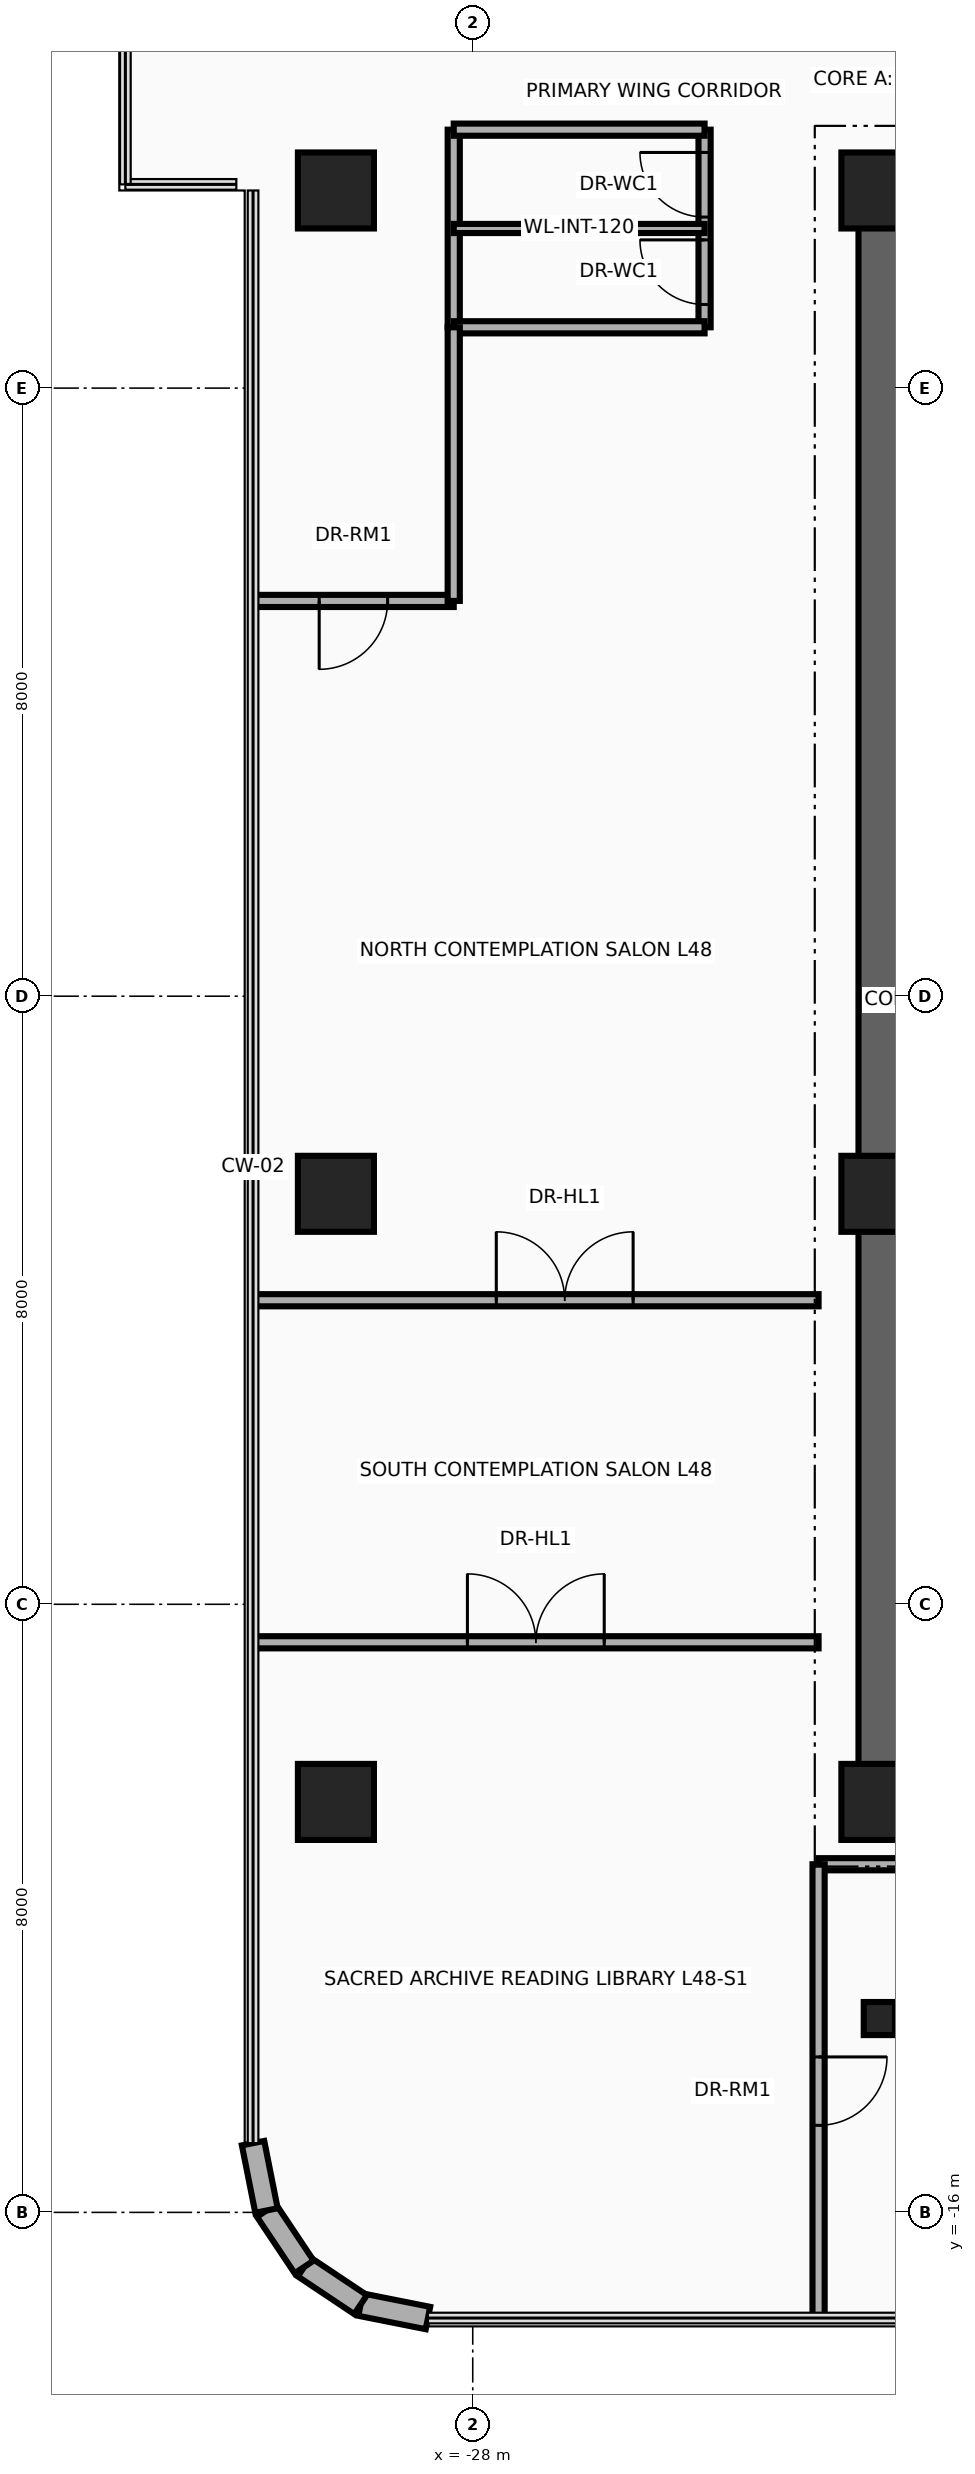
"""IFC4 building model, lengths in metres.
Left out: names, types, materials, properties, quantities, classifications, styles, units other than length and angle.
Written with IfcOpenShell. Run it as: python <this file> out.ifc"""

import sys

from ifc_helpers import new_model, si_unit, direction, frame, frame_2d, origin, origin_2d, place, context, subcontext, project, spatial, rectangle, i_section, extrude, source, transform, mapped, element, fill, save


model = new_model("IFC4")
c1 = context("Model", 3, precision=1e-05, world=origin(), true_north=direction((0.0, 1.0)))
c2 = subcontext(c1, "Body", "Model", "MODEL_VIEW")
j1 = project(units=[si_unit("LENGTHUNIT", "METRE"), si_unit("PLANEANGLEUNIT", "RADIAN")], contexts=[c1])
p1 = place(None, origin())
s1 = spatial("IfcSite", under=j1, at=p1, CompositionType="ELEMENT")
p2 = place(p1, origin())
s2 = spatial("IfcBuilding", under=s1, at=p2, CompositionType="ELEMENT")
p3 = place(p2, frame((0.0, 0.0, 188.4)))
s3 = spatial("IfcBuildingStorey", under=s2, at=p3, CompositionType="ELEMENT", Elevation=188.4)
p4 = place(p3, frame((-22.65, -11.075, 0.0), z_axis=(0.0, 0.0, 1.0), x_axis=(0.0, 1.0, 0.0)))
e1 = element("IfcWall", 1, at=p4, inside=s3, PredefinedType="SHEAR", context=c2, shape_type="SweptSolid", body=[
    extrude(rectangle(XDim=22.15, YDim=0.55, at=frame_2d((11.075, 0.0))), origin(), (0.0, 0.0, 1.0), 3.63),
])
for number, where, z_axis, x_axis in (
    (2, (-22.65, 10.8, 0.0), (0.0, 0.0, 1.0), (1.0, 0.0, 0.0)),
    (3, (-22.65, -10.8, 0.0), (0.0, 0.0, 1.0), (1.0, 0.0, 0.0)),
):
    element("IfcWall", number, at=place(p3, frame(where, z_axis=z_axis, x_axis=x_axis)), inside=s3, PredefinedType="SHEAR", context=c2, shape_type="SweptSolid", body=[
        extrude(rectangle(XDim=10.25, YDim=0.55, at=frame_2d((5.125, 0.0))), origin(), (0.0, 0.0, 1.0), 3.63),
    ])
m1 = source(origin(), c2, "Body", "SweptSolid", [
    extrude(rectangle(XDim=1.0, YDim=1.0, at=origin_2d()), origin(), (0.0, 0.0, 1.0), 3.95),
])
for number, where, z_axis, x_axis in (
    (4, (-29.8, -10.6, 0.0), (0.0, 0.0, 1.0), (1.0, 0.0, 0.0)),
    (5, (-22.65, -10.6, 0.0), (0.0, 0.0, 1.0), (1.0, 0.0, 0.0)),
    (6, (-29.8, -2.6, 0.0), (0.0, 0.0, 1.0), (1.0, 0.0, 0.0)),
    (7, (-22.65, -2.6, 0.0), (0.0, 0.0, 1.0), (1.0, 0.0, 0.0)),
    (8, (-29.8, 10.6, 0.0), (0.0, 0.0, 1.0), (1.0, 0.0, 0.0)),
    (9, (-22.65, 10.6, 0.0), (0.0, 0.0, 1.0), (1.0, 0.0, 0.0)),
):
    element("IfcColumn", number, at=place(p3, frame(where, z_axis=z_axis, x_axis=x_axis)), inside=s3, PredefinedType="COLUMN", context=c2, shape_type="MappedRepresentation", body=[
        mapped(m1, transform((0.0, 0.0, 0.0), x_axis=(1.0, 0.0, 0.0), y_axis=(0.0, 1.0, 0.0), z_axis=(0.0, 0.0, 1.0), scale=1.0)),
    ])
m2 = source(origin(), c2, "Body", "SweptSolid", [
    extrude(i_section(OverallWidth=0.412, OverallDepth=0.435, WebThickness=0.036, FlangeThickness=0.057, at=origin_2d()), origin(), (0.0, 0.0, 1.0), 3.95),
])
p5 = place(p3, frame((-22.65, -13.45, 0.0), z_axis=(0.0, 0.0, 1.0), x_axis=(1.0, 0.0, 0.0)))
e10 = element("IfcColumn", 10, at=p5, inside=s3, PredefinedType="COLUMN", context=c2, shape_type="MappedRepresentation", body=[
    mapped(m2, transform((0.0, 0.0, 0.0), x_axis=(1.0, 0.0, 0.0), y_axis=(0.0, 1.0, 0.0), z_axis=(0.0, 0.0, 1.0), scale=1.0)),
])
p6 = place(p3, frame((-28.589, -17.39, 0.0), z_axis=(0.0, 0.0, 1.0), x_axis=(-0.980798241101, 0.195025152871, 0.0)))
e11 = element("IfcWall", 11, at=p6, inside=s3, PredefinedType="SOLIDWALL", context=c2, shape_type="SweptSolid", body=[
    extrude(rectangle(XDim=0.904, YDim=0.3, at=frame_2d((0.452, 0.0))), origin(), (0.0, 0.0, 1.0), 3.63),
])
for number, where, z_axis, x_axis in (
    (12, (-29.476, -17.214, 0.0), (0.0, 0.0, 1.0), (-0.832, 0.556, 0.0)),
    (13, (-30.218, -16.718, 0.0), (0.0, 0.0, 1.0), (-0.556, 0.832, 0.0)),
):
    element("IfcWall", number, at=place(p3, frame(where, z_axis=z_axis, x_axis=x_axis)), inside=s3, PredefinedType="SOLIDWALL", context=c2, shape_type="SweptSolid", body=[
        extrude(rectangle(XDim=0.893, YDim=0.3, at=frame_2d((0.446, 0.0))), origin(), (0.0, 0.0, 1.0), 3.63),
    ])
p7 = place(p3, frame((-30.714, -15.976, 0.0), z_axis=(0.0, 0.0, 1.0), x_axis=(-0.195025152871, 0.980798241101, 0.0)))
e14 = element("IfcWall", 14, at=p7, inside=s3, PredefinedType="SOLIDWALL", context=c2, shape_type="SweptSolid", body=[
    extrude(rectangle(XDim=0.904, YDim=0.3, at=frame_2d((0.452, 0.0))), origin(), (0.0, 0.0, 1.0), 3.63),
])
p8 = place(p3, frame((-28.25, 8.8, 0.0), z_axis=(0.0, 0.0, 1.0), x_axis=(0.0, 1.0, 0.0)))
e15 = element("IfcWall", 15, at=p8, inside=s3, PredefinedType="PARTITIONING", context=c2, shape_type="SweptSolid", body=[
    extrude(rectangle(XDim=2.6, YDim=0.16, at=frame_2d((1.3, 0.0))), origin(), (0.0, 0.0, 1.0), 2.665),
])
p9 = place(p3, frame((-24.95, 8.8, 0.0), z_axis=(0.0, 0.0, 1.0), x_axis=(0.0, 1.0, 0.0)))
e16 = element("IfcWall", 16, at=p9, inside=s3, PredefinedType="PARTITIONING", context=c2, shape_type="SweptSolid", body=[
    extrude(rectangle(XDim=2.6, YDim=0.16, at=frame_2d((1.3, 0.0))), origin(), (0.0, 0.0, 1.0), 2.665),
])
p10 = place(p9, frame((0.3, 0.0, 0.0)))
e17 = element("IfcOpeningElement", 17, at=p10, cuts=e16, PredefinedType="OPENING", context=c2, shape_type="SweptSolid", body=[
    extrude(rectangle(XDim=0.85, YDim=2.1, at=frame_2d((0.425, 1.05))), frame((0.0, 0.095, 0.0), z_axis=(0.0, -1.0, 0.0), x_axis=(1.0, 0.0, 0.0)), (0.0, 0.0, 1.0), 0.19),
])
p11 = place(p9, frame((1.45, 0.0, 0.0)))
e18 = element("IfcOpeningElement", 18, at=p11, cuts=e16, PredefinedType="OPENING", context=c2, shape_type="SweptSolid", body=[
    extrude(rectangle(XDim=0.85, YDim=2.1, at=frame_2d((0.425, 1.05))), frame((0.0, 0.095, 0.0), z_axis=(0.0, -1.0, 0.0), x_axis=(1.0, 0.0, 0.0)), (0.0, 0.0, 1.0), 0.19),
])
for number, where, z_axis, x_axis in (
    (19, (-28.25, 8.8, 0.0), (0.0, 0.0, 1.0), (1.0, 0.0, 0.0)),
    (20, (-28.25, 11.4, 0.0), (0.0, 0.0, 1.0), (1.0, 0.0, 0.0)),
):
    element("IfcWall", number, at=place(p3, frame(where, z_axis=z_axis, x_axis=x_axis)), inside=s3, PredefinedType="PARTITIONING", context=c2, shape_type="SweptSolid", body=[
        extrude(rectangle(XDim=3.3, YDim=0.16, at=frame_2d((1.65, 0.0))), origin(), (0.0, 0.0, 1.0), 3.63),
    ])
p12 = place(p3, frame((-28.25, 10.1, 0.0), z_axis=(0.0, 0.0, 1.0), x_axis=(1.0, 0.0, 0.0)))
e21 = element("IfcWall", 21, at=p12, inside=s3, PredefinedType="PARTITIONING", context=c2, shape_type="SweptSolid", body=[
    extrude(rectangle(XDim=3.3, YDim=0.12, at=frame_2d((1.65, 0.0))), origin(), (0.0, 0.0, 1.0), 3.63),
])
p13 = place(p3, frame((-23.45, -11.42, 0.0), z_axis=(0.0, 0.0, 1.0), x_axis=(1.0, 0.0, 0.0)))
e22 = element("IfcWall", 22, at=p13, inside=s3, PredefinedType="PARTITIONING", context=c2, shape_type="SweptSolid", body=[
    extrude(rectangle(XDim=13.84, YDim=0.16, at=frame_2d((6.92, 0.0))), origin(), (0.0, 0.0, 1.0), 3.004),
])
p14 = place(p3, frame((-23.45, -17.39, 0.0), z_axis=(0.0, 0.0, 1.0), x_axis=(0.0, 1.0, 0.0)))
e23 = element("IfcWall", 23, at=p14, inside=s3, PredefinedType="PARTITIONING", context=c2, shape_type="SweptSolid", body=[
    extrude(rectangle(XDim=5.97, YDim=0.16, at=frame_2d((2.985, 0.0))), origin(), (0.0, 0.0, 1.0), 3.63),
])
p15 = place(p14, frame((2.535, 0.0, 0.0)))
e24 = element("IfcOpeningElement", 24, at=p15, cuts=e23, PredefinedType="OPENING", context=c2, shape_type="SweptSolid", body=[
    extrude(rectangle(XDim=0.9, YDim=2.1, at=frame_2d((0.45, 1.05))), frame((0.0, 0.095, 0.0), z_axis=(0.0, -1.0, 0.0), x_axis=(1.0, 0.0, 0.0)), (0.0, 0.0, 1.0), 0.19),
])
p16 = place(p3, frame((-30.89, -8.5, 0.0), z_axis=(0.0, 0.0, 1.0), x_axis=(1.0, 0.0, 0.0)))
e25 = element("IfcWall", 25, at=p16, inside=s3, PredefinedType="PARTITIONING", context=c2, shape_type="SweptSolid", body=[
    extrude(rectangle(XDim=7.44, YDim=0.16, at=frame_2d((3.72, 0.0))), origin(), (0.0, 0.0, 1.0), 3.076),
])
p17 = place(p16, frame((2.82, 0.0, 0.0)))
e26 = element("IfcOpeningElement", 26, at=p17, cuts=e25, PredefinedType="OPENING", context=c2, shape_type="SweptSolid", body=[
    extrude(rectangle(XDim=1.8, YDim=2.15, at=frame_2d((0.9, 1.075))), frame((0.0, 0.095, 0.0), z_axis=(0.0, -1.0, 0.0), x_axis=(1.0, 0.0, 0.0)), (0.0, 0.0, 1.0), 0.19),
])
p18 = place(p3, frame((-30.89, 5.2, 0.0), z_axis=(0.0, 0.0, 1.0), x_axis=(1.0, 0.0, 0.0)))
e27 = element("IfcWall", 27, at=p18, inside=s3, PredefinedType="PARTITIONING", context=c2, shape_type="SweptSolid", body=[
    extrude(rectangle(XDim=2.64, YDim=0.16, at=frame_2d((1.32, 0.0))), origin(), (0.0, 0.0, 1.0), 3.076),
])
p19 = place(p18, frame((0.87, 0.0, 0.0)))
e28 = element("IfcOpeningElement", 28, at=p19, cuts=e27, PredefinedType="OPENING", context=c2, shape_type="SweptSolid", body=[
    extrude(rectangle(XDim=0.9, YDim=2.1, at=frame_2d((0.45, 1.05))), frame((0.0, 0.095, 0.0), z_axis=(0.0, -1.0, 0.0), x_axis=(1.0, 0.0, 0.0)), (0.0, 0.0, 1.0), 0.19),
])
p20 = place(p3, frame((-28.25, 5.2, 0.0), z_axis=(0.0, 0.0, 1.0), x_axis=(0.0, 1.0, 0.0)))
e29 = element("IfcWall", 29, at=p20, inside=s3, PredefinedType="PARTITIONING", context=c2, shape_type="SweptSolid", body=[
    extrude(rectangle(XDim=3.6, YDim=0.16, at=frame_2d((1.8, 0.0))), origin(), (0.0, 0.0, 1.0), 3.158),
])
p21 = place(p3, frame((-30.89, -4.0, 0.0), z_axis=(0.0, 0.0, 1.0), x_axis=(1.0, 0.0, 0.0)))
e30 = element("IfcWall", 30, at=p21, inside=s3, PredefinedType="PARTITIONING", context=c2, shape_type="SweptSolid", body=[
    extrude(rectangle(XDim=7.44, YDim=0.16, at=frame_2d((3.72, 0.0))), origin(), (0.0, 0.0, 1.0), 3.076),
])
p22 = place(p21, frame((3.2, 0.0, 0.0)))
e31 = element("IfcOpeningElement", 31, at=p22, cuts=e30, PredefinedType="OPENING", context=c2, shape_type="SweptSolid", body=[
    extrude(rectangle(XDim=1.8, YDim=2.15, at=frame_2d((0.9, 1.075))), frame((0.0, 0.095, 0.0), z_axis=(0.0, -1.0, 0.0), x_axis=(1.0, 0.0, 0.0)), (0.0, 0.0, 1.0), 0.19),
])
p23 = place(p10, origin())
e32 = element("IfcDoor", 32, at=p23, inside=s3, OperationType="SINGLE_SWING_RIGHT", PredefinedType="DOOR", context=c2, shape_type="SweptSolid", body=[
    extrude(rectangle(XDim=0.85, YDim=2.1, at=frame_2d((0.425, 1.05))), frame((0.0, 0.025, 0.0), z_axis=(0.0, -1.0, 0.0), x_axis=(1.0, 0.0, 0.0)), (0.0, 0.0, 1.0), 0.05),
])
fill(e17, e32)
p24 = place(p11, origin())
e33 = element("IfcDoor", 33, at=p24, inside=s3, OperationType="SINGLE_SWING_LEFT", PredefinedType="DOOR", context=c2, shape_type="SweptSolid", body=[
    extrude(rectangle(XDim=0.85, YDim=2.1, at=frame_2d((0.425, 1.05))), frame((0.0, 0.025, 0.0), z_axis=(0.0, -1.0, 0.0), x_axis=(1.0, 0.0, 0.0)), (0.0, 0.0, 1.0), 0.05),
])
fill(e18, e33)
p25 = place(p17, origin())
e34 = element("IfcDoor", 34, at=p25, inside=s3, OperationType="DOUBLE_DOOR_SINGLE_SWING", PredefinedType="DOOR", context=c2, shape_type="SweptSolid", body=[
    extrude(rectangle(XDim=1.8, YDim=2.15, at=frame_2d((0.9, 1.075))), frame((0.0, 0.025, 0.0), z_axis=(0.0, -1.0, 0.0), x_axis=(1.0, 0.0, 0.0)), (0.0, 0.0, 1.0), 0.05),
])
fill(e26, e34)
p26 = place(p19, frame((0.9, 0.0, 0.0), z_axis=(0.0, 0.0, 1.0), x_axis=(-1.0, 0.0, 0.0)))
e35 = element("IfcDoor", 35, at=p26, inside=s3, OperationType="SINGLE_SWING_LEFT", PredefinedType="DOOR", context=c2, shape_type="SweptSolid", body=[
    extrude(rectangle(XDim=0.9, YDim=2.1, at=frame_2d((0.45, 1.05))), frame((0.0, 0.025, 0.0), z_axis=(0.0, -1.0, 0.0), x_axis=(1.0, 0.0, 0.0)), (0.0, 0.0, 1.0), 0.05),
])
fill(e28, e35)
p27 = place(p22, origin())
e36 = element("IfcDoor", 36, at=p27, inside=s3, OperationType="DOUBLE_DOOR_SINGLE_SWING", PredefinedType="DOOR", context=c2, shape_type="SweptSolid", body=[
    extrude(rectangle(XDim=1.8, YDim=2.15, at=frame_2d((0.9, 1.075))), frame((0.0, 0.025, 0.0), z_axis=(0.0, -1.0, 0.0), x_axis=(1.0, 0.0, 0.0)), (0.0, 0.0, 1.0), 0.05),
])
fill(e31, e36)
p28 = place(p15, frame((0.9, 0.0, 0.0), z_axis=(0.0, 0.0, 1.0), x_axis=(-1.0, 0.0, 0.0)))
e37 = element("IfcDoor", 37, at=p28, inside=s3, OperationType="SINGLE_SWING_LEFT", PredefinedType="DOOR", context=c2, shape_type="SweptSolid", body=[
    extrude(rectangle(XDim=0.9, YDim=2.1, at=frame_2d((0.45, 1.05))), frame((0.0, 0.025, 0.0), z_axis=(0.0, -1.0, 0.0), x_axis=(1.0, 0.0, 0.0)), (0.0, 0.0, 1.0), 0.05),
])
fill(e24, e37)
save(model, sys.argv[1])
